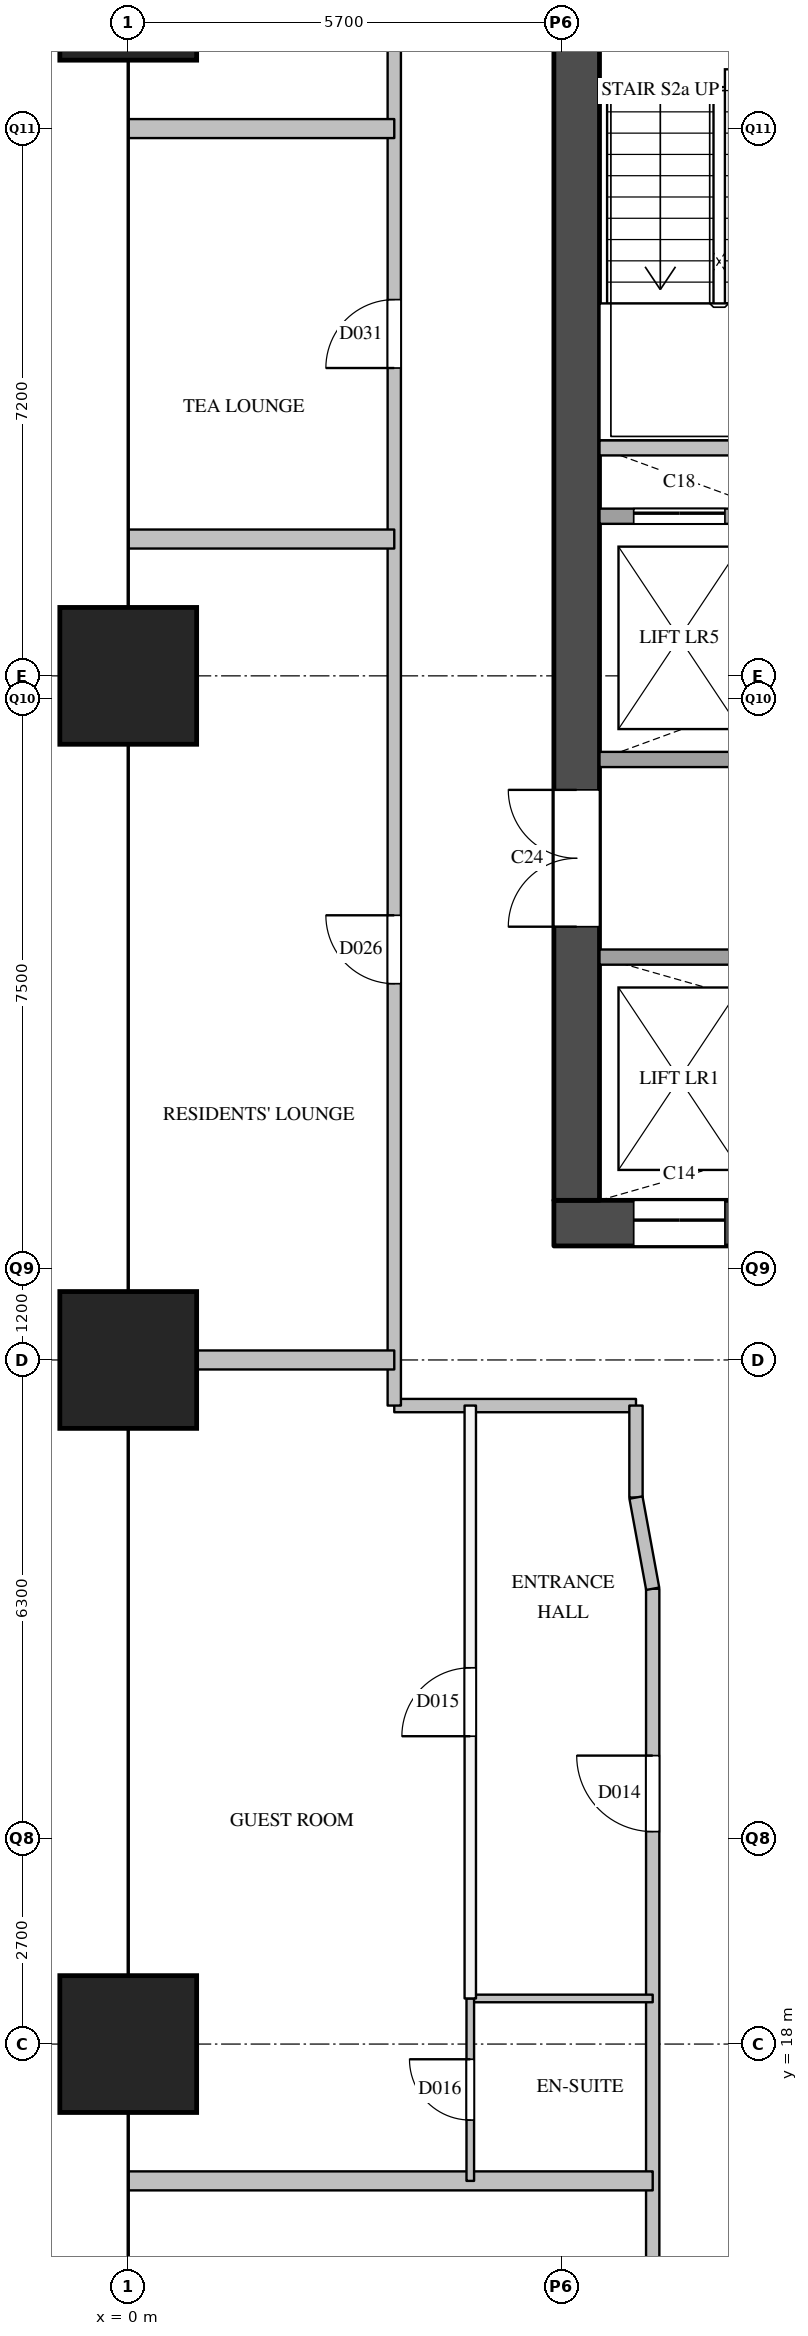
"""IFC4 building model, lengths in metres.
Left out: names, types, materials, properties, quantities, classifications, styles, units other than length and angle.
Written with IfcOpenShell. Run it as: python <this file> out.ifc"""

import sys

from ifc_helpers import new_model, si_unit, direction, frame, frame_2d, origin, origin_2d, place, context, subcontext, project, spatial, rectangle, extrude, element, fill, save


model = new_model("IFC4")
c1 = context("Model", 3, precision=1e-05, world=origin(), true_north=direction((0.0, 1.0)))
c2 = subcontext(c1, "Body", "Model", "MODEL_VIEW")
j1 = project(units=[si_unit("LENGTHUNIT", "METRE"), si_unit("PLANEANGLEUNIT", "RADIAN")], contexts=[c1])
p1 = place(None, origin())
s1 = spatial("IfcSite", under=j1, at=p1, CompositionType="ELEMENT")
p2 = place(p1, origin())
s2 = spatial("IfcBuilding", under=s1, at=p2, CompositionType="ELEMENT")
p3 = place(p2, frame((0.0, 0.0, 53.8)))
s3 = spatial("IfcBuildingStorey", under=s2, at=p3, CompositionType="ELEMENT", Elevation=53.8)
for number, where, z_axis, x_axis in (
    (1, (0.0, 18.0, 0.0), (0.0, 0.0, 1.0), (1.0, 0.0, 0.0)),
    (2, (0.0, 27.0, 0.0), (0.0, 0.0, 1.0), (1.0, 0.0, 0.0)),
    (3, (0.0, 36.0, 0.0), (0.0, 0.0, 1.0), (1.0, 0.0, 0.0)),
    (4, (0.0, 45.0, 0.0), (0.0, 0.0, 1.0), (1.0, 0.0, 0.0)),
):
    element("IfcColumn", number, at=place(p3, frame(where, z_axis=z_axis, x_axis=x_axis)), inside=s3, PredefinedType="COLUMN", context=c2, shape_type="SweptSolid", body=[
        extrude(rectangle(XDim=1.8, YDim=1.8, at=origin_2d()), origin(), (0.0, 0.0, 1.0), 3.8),
    ])
p4 = place(p3, frame((5.6, 28.8, 0.0), z_axis=(0.0, 0.0, 1.0), x_axis=(1.0, 0.0, 0.0)))
e5 = element("IfcWall", 5, at=p4, inside=s3, PredefinedType="SHEAR", context=c2, shape_type="SweptSolid", body=[
    extrude(rectangle(XDim=12.4, YDim=0.6, at=frame_2d((6.2, 0.0))), origin(), (0.0, 0.0, 1.0), 3.5),
])
p5 = place(p4, frame((1.05, 0.0, 0.0)))
e6 = element("IfcOpeningElement", 6, at=p5, cuts=e5, PredefinedType="OPENING", context=c2, shape_type="SweptSolid", body=[
    extrude(rectangle(XDim=1.2, YDim=2.1, at=frame_2d((0.6, 1.05))), frame((0.0, 0.31, 0.0), z_axis=(0.0, -1.0, 0.0), x_axis=(1.0, 0.0, 0.0)), (0.0, 0.0, 1.0), 0.62),
])
p6 = place(p4, frame((5.25, 0.0, 0.0)))
e7 = element("IfcOpeningElement", 7, at=p6, cuts=e5, PredefinedType="OPENING", context=c2, shape_type="SweptSolid", body=[
    extrude(rectangle(XDim=1.2, YDim=2.1, at=frame_2d((0.6, 1.05))), frame((0.0, 0.31, 0.0), z_axis=(0.0, -1.0, 0.0), x_axis=(1.0, 0.0, 0.0)), (0.0, 0.0, 1.0), 0.62),
])
p7 = place(p4, frame((7.35, 0.0, 0.0)))
e8 = element("IfcOpeningElement", 8, at=p7, cuts=e5, PredefinedType="OPENING", context=c2, shape_type="SweptSolid", body=[
    extrude(rectangle(XDim=1.2, YDim=2.1, at=frame_2d((0.6, 1.05))), frame((0.0, 0.31, 0.0), z_axis=(0.0, -1.0, 0.0), x_axis=(1.0, 0.0, 0.0)), (0.0, 0.0, 1.0), 0.62),
])
p8 = place(p3, frame((5.9, 29.1, 0.0), z_axis=(0.0, 0.0, 1.0), x_axis=(0.0, 1.0, 0.0)))
e9 = element("IfcWall", 9, at=p8, inside=s3, PredefinedType="SHEAR", context=c2, shape_type="SweptSolid", body=[
    extrude(rectangle(XDim=20.3, YDim=0.6, at=frame_2d((10.15, 0.0))), origin(), (0.0, 0.0, 1.0), 3.5),
])
p9 = place(p8, frame((3.6, 0.0, 0.0)))
e10 = element("IfcOpeningElement", 10, at=p9, cuts=e9, PredefinedType="OPENING", context=c2, shape_type="SweptSolid", body=[
    extrude(rectangle(XDim=1.8, YDim=2.1, at=frame_2d((0.9, 1.05))), frame((0.0, 0.31, 0.0), z_axis=(0.0, -1.0, 0.0), x_axis=(1.0, 0.0, 0.0)), (0.0, 0.0, 1.0), 0.62),
])
p10 = place(p8, frame((16.4, 0.0, 0.0)))
e11 = element("IfcOpeningElement", 11, at=p10, cuts=e9, PredefinedType="OPENING", context=c2, shape_type="SweptSolid", body=[
    extrude(rectangle(XDim=1.0, YDim=2.1, at=frame_2d((0.5, 1.05))), frame((0.0, 0.31, 0.0), z_axis=(0.0, -1.0, 0.0), x_axis=(1.0, 0.0, 0.0)), (0.0, 0.0, 1.0), 0.62),
])
p11 = place(p3, frame((6.2, 32.3, 0.0), z_axis=(0.0, 0.0, 1.0), x_axis=(1.0, 0.0, 0.0)))
e12 = element("IfcWall", 12, at=p11, inside=s3, PredefinedType="SOLIDWALL", context=c2, shape_type="SweptSolid", body=[
    extrude(rectangle(XDim=11.2, YDim=0.2, at=frame_2d((5.6, 0.0))), origin(), (0.0, 0.0, 1.0), 3.5),
])
p12 = place(p11, frame((2.55, 0.0, 0.0)))
e13 = element("IfcOpeningElement", 13, at=p12, cuts=e12, PredefinedType="OPENING", context=c2, shape_type="SweptSolid", body=[
    extrude(rectangle(XDim=1.2, YDim=2.1, at=frame_2d((0.6, 1.05))), frame((0.0, 0.11, 0.0), z_axis=(0.0, -1.0, 0.0), x_axis=(1.0, 0.0, 0.0)), (0.0, 0.0, 1.0), 0.22),
])
p13 = place(p3, frame((6.2, 34.9, 0.0), z_axis=(0.0, 0.0, 1.0), x_axis=(1.0, 0.0, 0.0)))
e14 = element("IfcWall", 14, at=p13, inside=s3, PredefinedType="SOLIDWALL", context=c2, shape_type="SweptSolid", body=[
    extrude(rectangle(XDim=11.2, YDim=0.2, at=frame_2d((5.6, 0.0))), origin(), (0.0, 0.0, 1.0), 3.5),
])
p14 = place(p3, frame((6.2, 38.1, 0.0), z_axis=(0.0, 0.0, 1.0), x_axis=(1.0, 0.0, 0.0)))
e15 = element("IfcWall", 15, at=p14, inside=s3, PredefinedType="SOLIDWALL", context=c2, shape_type="SweptSolid", body=[
    extrude(rectangle(XDim=11.2, YDim=0.2, at=frame_2d((5.6, 0.0))), origin(), (0.0, 0.0, 1.0), 3.5),
])
p15 = place(p14, frame((0.45, 0.0, 0.0)))
e16 = element("IfcOpeningElement", 16, at=p15, cuts=e15, PredefinedType="OPENING", context=c2, shape_type="SweptSolid", body=[
    extrude(rectangle(XDim=1.2, YDim=2.1, at=frame_2d((0.6, 1.05))), frame((0.0, 0.11, 0.0), z_axis=(0.0, -1.0, 0.0), x_axis=(1.0, 0.0, 0.0)), (0.0, 0.0, 1.0), 0.22),
])
p16 = place(p14, frame((2.55, 0.0, 0.0)))
e17 = element("IfcOpeningElement", 17, at=p16, cuts=e15, PredefinedType="OPENING", context=c2, shape_type="SweptSolid", body=[
    extrude(rectangle(XDim=1.2, YDim=2.1, at=frame_2d((0.6, 1.05))), frame((0.0, 0.11, 0.0), z_axis=(0.0, -1.0, 0.0), x_axis=(1.0, 0.0, 0.0)), (0.0, 0.0, 1.0), 0.22),
])
p17 = place(p14, frame((4.65, 0.0, 0.0)))
e18 = element("IfcOpeningElement", 18, at=p17, cuts=e15, PredefinedType="OPENING", context=c2, shape_type="SweptSolid", body=[
    extrude(rectangle(XDim=1.2, YDim=2.1, at=frame_2d((0.6, 1.05))), frame((0.0, 0.11, 0.0), z_axis=(0.0, -1.0, 0.0), x_axis=(1.0, 0.0, 0.0)), (0.0, 0.0, 1.0), 0.22),
])
p18 = place(p14, frame((6.75, 0.0, 0.0)))
e19 = element("IfcOpeningElement", 19, at=p18, cuts=e15, PredefinedType="OPENING", context=c2, shape_type="SweptSolid", body=[
    extrude(rectangle(XDim=1.2, YDim=2.1, at=frame_2d((0.6, 1.05))), frame((0.0, 0.11, 0.0), z_axis=(0.0, -1.0, 0.0), x_axis=(1.0, 0.0, 0.0)), (0.0, 0.0, 1.0), 0.22),
])
p19 = place(p3, frame((6.2, 39.0, 0.0), z_axis=(0.0, 0.0, 1.0), x_axis=(1.0, 0.0, 0.0)))
e20 = element("IfcWall", 20, at=p19, inside=s3, PredefinedType="SOLIDWALL", context=c2, shape_type="SweptSolid", body=[
    extrude(rectangle(XDim=3.05, YDim=0.2, at=frame_2d((1.525, 0.0))), origin(), (0.0, 0.0, 1.0), 3.5),
])
p20 = place(p3, frame((3.5, 26.4, 0.0), z_axis=(0.0, 0.0, 1.0), x_axis=(1.0, 0.0, 0.0)))
e21 = element("IfcWall", 21, at=p20, inside=s3, PredefinedType="PARTITIONING", context=c2, shape_type="SweptSolid", body=[
    extrude(rectangle(XDim=3.18, YDim=0.175, at=frame_2d((1.59, 0.0))), origin(), (0.0, 0.0, 1.0), 3.5),
])
p21 = place(p3, frame((3.5, 26.4, 0.0), z_axis=(0.0, 0.0, 1.0), x_axis=(0.0, 1.0, 0.0)))
e22 = element("IfcWall", 22, at=p21, inside=s3, PredefinedType="PARTITIONING", context=c2, shape_type="SweptSolid", body=[
    extrude(rectangle(XDim=25.7, YDim=0.175, at=frame_2d((12.85, 0.0))), origin(), (0.0, 0.0, 1.0), 2.5),
])
p22 = place(p21, frame((5.55, 0.0, 0.0)))
e23 = element("IfcOpeningElement", 23, at=p22, cuts=e22, PredefinedType="OPENING", context=c2, shape_type="SweptSolid", body=[
    extrude(rectangle(XDim=0.9, YDim=2.1, at=frame_2d((0.45, 1.05))), frame((0.0, 0.097, 0.0), z_axis=(0.0, -1.0, 0.0), x_axis=(1.0, 0.0, 0.0)), (0.0, 0.0, 1.0), 0.195),
])
p23 = place(p21, frame((13.65, 0.0, 0.0)))
e24 = element("IfcOpeningElement", 24, at=p23, cuts=e22, PredefinedType="OPENING", context=c2, shape_type="SweptSolid", body=[
    extrude(rectangle(XDim=0.9, YDim=2.1, at=frame_2d((0.45, 1.05))), frame((0.0, 0.097, 0.0), z_axis=(0.0, -1.0, 0.0), x_axis=(1.0, 0.0, 0.0)), (0.0, 0.0, 1.0), 0.195),
])
p24 = place(p21, frame((20.8, 0.0, 0.0)))
e25 = element("IfcOpeningElement", 25, at=p24, cuts=e22, PredefinedType="OPENING", context=c2, shape_type="SweptSolid", body=[
    extrude(rectangle(XDim=0.9, YDim=2.1, at=frame_2d((0.45, 1.05))), frame((0.0, 0.097, 0.0), z_axis=(0.0, -1.0, 0.0), x_axis=(1.0, 0.0, 0.0)), (0.0, 0.0, 1.0), 0.195),
])
p25 = place(p3, frame((6.68, 25.19, 0.0), z_axis=(0.0, 0.0, 1.0), x_axis=(0.0, 1.0, 0.0)))
e26 = element("IfcWall", 26, at=p25, inside=s3, PredefinedType="PARTITIONING", context=c2, shape_type="SweptSolid", body=[
    extrude(rectangle(XDim=1.21, YDim=0.175, at=frame_2d((0.605, 0.0))), origin(), (0.0, 0.0, 1.0), 3.5),
])
p26 = place(p3, frame((6.9, 6.9, 0.0), z_axis=(0.0, 0.0, 1.0), x_axis=(0.0, 1.0, 0.0)))
e27 = element("IfcWall", 27, at=p26, inside=s3, PredefinedType="PARTITIONING", context=c2, shape_type="SweptSolid", body=[
    extrude(rectangle(XDim=17.09, YDim=0.175, at=frame_2d((8.545, 0.0))), origin(), (0.0, 0.0, 1.0), 3.5),
])
p27 = place(p26, frame((4.2, 0.0, 0.0)))
e28 = element("IfcOpeningElement", 28, at=p27, cuts=e27, PredefinedType="OPENING", context=c2, shape_type="SweptSolid", body=[
    extrude(rectangle(XDim=0.9, YDim=2.1, at=frame_2d((0.45, 1.05))), frame((0.0, 0.097, 0.0), z_axis=(0.0, -1.0, 0.0), x_axis=(1.0, 0.0, 0.0)), (0.0, 0.0, 1.0), 0.195),
])
p28 = place(p26, frame((13.895, 0.0, 0.0)))
e29 = element("IfcOpeningElement", 29, at=p28, cuts=e27, PredefinedType="OPENING", context=c2, shape_type="SweptSolid", body=[
    extrude(rectangle(XDim=1.0, YDim=2.1, at=frame_2d((0.5, 1.05))), frame((0.0, 0.097, 0.0), z_axis=(0.0, -1.0, 0.0), x_axis=(1.0, 0.0, 0.0)), (0.0, 0.0, 1.0), 0.195),
])
p29 = place(p3, frame((4.5, 18.6, 0.0), z_axis=(0.0, 0.0, 1.0), x_axis=(0.0, 1.0, 0.0)))
e30 = element("IfcWall", 30, at=p29, inside=s3, PredefinedType="PARTITIONING", context=c2, shape_type="SweptSolid", body=[
    extrude(rectangle(XDim=7.8, YDim=0.15, at=frame_2d((3.9, 0.0))), origin(), (0.0, 0.0, 1.0), 3.5),
])
p30 = place(p29, frame((3.45, 0.0, 0.0)))
e31 = element("IfcOpeningElement", 31, at=p30, cuts=e30, PredefinedType="OPENING", context=c2, shape_type="SweptSolid", body=[
    extrude(rectangle(XDim=0.9, YDim=2.1, at=frame_2d((0.45, 1.05))), frame((0.0, 0.085, 0.0), z_axis=(0.0, -1.0, 0.0), x_axis=(1.0, 0.0, 0.0)), (0.0, 0.0, 1.0), 0.17),
])
p31 = place(p3, frame((0.0, 16.2, 0.0), z_axis=(0.0, 0.0, 1.0), x_axis=(1.0, 0.0, 0.0)))
e32 = element("IfcWall", 32, at=p31, inside=s3, PredefinedType="PARTITIONING", context=c2, shape_type="SweptSolid", body=[
    extrude(rectangle(XDim=6.9, YDim=0.25, at=frame_2d((3.45, 0.0))), origin(), (0.0, 0.0, 1.0), 2.5),
])
for number, where, z_axis, x_axis in (
    (33, (0.0, 27.0, 0.0), (0.0, 0.0, 1.0), (1.0, 0.0, 0.0)),
    (34, (0.0, 37.8, 0.0), (0.0, 0.0, 1.0), (1.0, 0.0, 0.0)),
    (35, (0.0, 43.2, 0.0), (0.0, 0.0, 1.0), (1.0, 0.0, 0.0)),
):
    element("IfcWall", number, at=place(p3, frame(where, z_axis=z_axis, x_axis=x_axis)), inside=s3, PredefinedType="PARTITIONING", context=c2, shape_type="SweptSolid", body=[
        extrude(rectangle(XDim=3.5, YDim=0.25, at=frame_2d((1.75, 0.0))), origin(), (0.0, 0.0, 1.0), 2.5),
    ])
p32 = place(p3, frame((4.5, 18.6, 0.0), z_axis=(0.0, 0.0, 1.0), x_axis=(1.0, 0.0, 0.0)))
e36 = element("IfcWall", 36, at=p32, inside=s3, PredefinedType="PARTITIONING", context=c2, shape_type="SweptSolid", body=[
    extrude(rectangle(XDim=2.4, YDim=0.1, at=frame_2d((1.2, 0.0))), origin(), (0.0, 0.0, 1.0), 3.5),
])
p33 = place(p3, frame((4.5, 16.2, 0.0), z_axis=(0.0, 0.0, 1.0), x_axis=(0.0, 1.0, 0.0)))
e37 = element("IfcWall", 37, at=p33, inside=s3, PredefinedType="PARTITIONING", context=c2, shape_type="SweptSolid", body=[
    extrude(rectangle(XDim=2.4, YDim=0.1, at=frame_2d((1.2, 0.0))), origin(), (0.0, 0.0, 1.0), 3.5),
])
p34 = place(p33, frame((0.8, 0.0, 0.0)))
e38 = element("IfcOpeningElement", 38, at=p34, cuts=e37, PredefinedType="OPENING", context=c2, shape_type="SweptSolid", body=[
    extrude(rectangle(XDim=0.8, YDim=2.1, at=frame_2d((0.4, 1.05))), frame((0.0, 0.06, 0.0), z_axis=(0.0, -1.0, 0.0), x_axis=(1.0, 0.0, 0.0)), (0.0, 0.0, 1.0), 0.12),
])
p35 = place(p3, frame((6.9, 23.99, 0.0), z_axis=(0.0, 0.0, 1.0), x_axis=(-0.180311734132, 0.983609515272, 0.0)))
e39 = element("IfcWall", 39, at=p35, inside=s3, PredefinedType="PARTITIONING", context=c2, shape_type="SweptSolid", body=[
    extrude(rectangle(XDim=1.22, YDim=0.175, at=frame_2d((0.61, 0.0))), origin(), (0.0, 0.0, 1.0), 3.5),
])
p36 = place(p5, origin())
e40 = element("IfcDoor", 40, at=p36, inside=s3, OperationType="SLIDING_TO_LEFT", PredefinedType="DOOR", context=c2, shape_type="SweptSolid", body=[
    extrude(rectangle(XDim=1.2, YDim=2.1, at=frame_2d((0.6, 1.05))), frame((0.0, 0.025, 0.0), z_axis=(0.0, -1.0, 0.0), x_axis=(1.0, 0.0, 0.0)), (0.0, 0.0, 1.0), 0.05),
])
fill(e6, e40)
p37 = place(p15, origin())
e41 = element("IfcDoor", 41, at=p37, inside=s3, OperationType="SLIDING_TO_LEFT", PredefinedType="DOOR", context=c2, shape_type="SweptSolid", body=[
    extrude(rectangle(XDim=1.2, YDim=2.1, at=frame_2d((0.6, 1.05))), frame((0.0, 0.025, 0.0), z_axis=(0.0, -1.0, 0.0), x_axis=(1.0, 0.0, 0.0)), (0.0, 0.0, 1.0), 0.05),
])
fill(e16, e41)
p38 = place(p9, origin())
e42 = element("IfcDoor", 42, at=p38, inside=s3, OperationType="DOUBLE_DOOR_SINGLE_SWING", PredefinedType="DOOR", context=c2, shape_type="SweptSolid", body=[
    extrude(rectangle(XDim=1.8, YDim=2.1, at=frame_2d((0.9, 1.05))), frame((0.0, 0.025, 0.0), z_axis=(0.0, -1.0, 0.0), x_axis=(1.0, 0.0, 0.0)), (0.0, 0.0, 1.0), 0.05),
])
fill(e10, e42)
p39 = place(p28, origin())
e43 = element("IfcDoor", 43, at=p39, inside=s3, OperationType="SINGLE_SWING_RIGHT", PredefinedType="DOOR", context=c2, shape_type="SweptSolid", body=[
    extrude(rectangle(XDim=1.0, YDim=2.1, at=frame_2d((0.5, 1.05))), frame((0.0, 0.025, 0.0), z_axis=(0.0, -1.0, 0.0), x_axis=(1.0, 0.0, 0.0)), (0.0, 0.0, 1.0), 0.05),
])
fill(e29, e43)
p40 = place(p30, origin())
e44 = element("IfcDoor", 44, at=p40, inside=s3, OperationType="SINGLE_SWING_LEFT", PredefinedType="DOOR", context=c2, shape_type="SweptSolid", body=[
    extrude(rectangle(XDim=0.9, YDim=2.1, at=frame_2d((0.45, 1.05))), frame((0.0, 0.025, 0.0), z_axis=(0.0, -1.0, 0.0), x_axis=(1.0, 0.0, 0.0)), (0.0, 0.0, 1.0), 0.05),
])
fill(e31, e44)
p41 = place(p34, origin())
e45 = element("IfcDoor", 45, at=p41, inside=s3, OperationType="SINGLE_SWING_RIGHT", PredefinedType="DOOR", context=c2, shape_type="SweptSolid", body=[
    extrude(rectangle(XDim=0.8, YDim=2.1, at=frame_2d((0.4, 1.05))), frame((0.0, 0.025, 0.0), z_axis=(0.0, -1.0, 0.0), x_axis=(1.0, 0.0, 0.0)), (0.0, 0.0, 1.0), 0.05),
])
fill(e38, e45)
p42 = place(p22, origin())
e46 = element("IfcDoor", 46, at=p42, inside=s3, OperationType="SINGLE_SWING_RIGHT", PredefinedType="DOOR", context=c2, shape_type="SweptSolid", body=[
    extrude(rectangle(XDim=0.9, YDim=2.1, at=frame_2d((0.45, 1.05))), frame((0.0, 0.025, 0.0), z_axis=(0.0, -1.0, 0.0), x_axis=(1.0, 0.0, 0.0)), (0.0, 0.0, 1.0), 0.05),
])
fill(e23, e46)
p43 = place(p23, origin())
e47 = element("IfcDoor", 47, at=p43, inside=s3, OperationType="SINGLE_SWING_LEFT", PredefinedType="DOOR", context=c2, shape_type="SweptSolid", body=[
    extrude(rectangle(XDim=0.9, YDim=2.1, at=frame_2d((0.45, 1.05))), frame((0.0, 0.025, 0.0), z_axis=(0.0, -1.0, 0.0), x_axis=(1.0, 0.0, 0.0)), (0.0, 0.0, 1.0), 0.05),
])
fill(e24, e47)
save(model, sys.argv[1])
